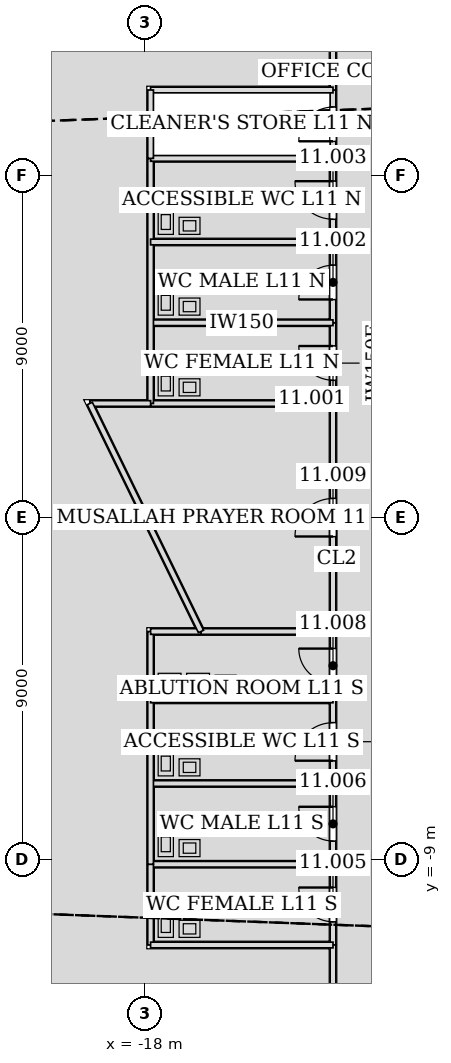
"""IFC4 building model, lengths in metres.
Left out: names, types, materials, properties, quantities, classifications, styles, units other than length and angle.
Written with IfcOpenShell. Run it as: python <this file> out.ifc"""

import sys

from ifc_helpers import new_model, si_unit, direction, frame, frame_2d, origin, place, context, subcontext, project, spatial, rectangle, extrude, element, fill, save


model = new_model("IFC4")
c1 = context("Model", 3, precision=1e-05, world=origin(), true_north=direction((0.0, 1.0)))
c2 = subcontext(c1, "Body", "Model", "MODEL_VIEW")
j1 = project(units=[si_unit("LENGTHUNIT", "METRE"), si_unit("PLANEANGLEUNIT", "RADIAN")], contexts=[c1])
p1 = place(None, origin())
s1 = spatial("IfcSite", under=j1, at=p1, CompositionType="ELEMENT")
p2 = place(p1, origin())
s2 = spatial("IfcBuilding", under=s1, at=p2, CompositionType="ELEMENT")
p3 = place(p2, frame((0.0, 0.0, 54.0)))
s3 = spatial("IfcBuildingStorey", under=s2, at=p3, CompositionType="ELEMENT", Elevation=54.0)
p4 = place(p3, frame((-13.05, 5.126, 0.0), z_axis=(0.0, 0.0, 1.0), x_axis=(0.0, -1.0, 0.0)))
e1 = element("IfcWall", 1, at=p4, inside=s3, PredefinedType="PARTITIONING", context=c2, shape_type="SweptSolid", body=[
    extrude(rectangle(XDim=2.127, YDim=0.15, at=frame_2d((1.063, 0.0))), origin(), (0.0, 0.0, 1.0), 4.035),
])
p5 = place(p4, frame((0.614, 0.0, 0.0)))
e2 = element("IfcOpeningElement", 2, at=p5, cuts=e1, PredefinedType="OPENING", context=c2, shape_type="SweptSolid", body=[
    extrude(rectangle(XDim=0.9, YDim=2.1, at=frame_2d((0.45, 1.05))), frame((0.0, 0.085, 0.0), z_axis=(0.0, -1.0, 0.0), x_axis=(1.0, 0.0, 0.0)), (0.0, 0.0, 1.0), 0.17),
])
p6 = place(p3, frame((-13.05, 7.251, 0.0), z_axis=(0.0, 0.0, 1.0), x_axis=(0.0, -1.0, 0.0)))
e3 = element("IfcWall", 3, at=p6, inside=s3, PredefinedType="PARTITIONING", context=c2, shape_type="SweptSolid", body=[
    extrude(rectangle(XDim=2.127, YDim=0.15, at=frame_2d((1.063, 0.0))), origin(), (0.0, 0.0, 1.0), 4.035),
])
p7 = place(p6, frame((0.614, 0.0, 0.0)))
e4 = element("IfcOpeningElement", 4, at=p7, cuts=e3, PredefinedType="OPENING", context=c2, shape_type="SweptSolid", body=[
    extrude(rectangle(XDim=0.9, YDim=2.1, at=frame_2d((0.45, 1.05))), frame((0.0, 0.085, 0.0), z_axis=(0.0, -1.0, 0.0), x_axis=(1.0, 0.0, 0.0)), (0.0, 0.0, 1.0), 0.17),
])
p8 = place(p3, frame((-13.05, 9.451, 0.0), z_axis=(0.0, 0.0, 1.0), x_axis=(0.0, -1.0, 0.0)))
e5 = element("IfcWall", 5, at=p8, inside=s3, PredefinedType="PARTITIONING", context=c2, shape_type="SweptSolid", body=[
    extrude(rectangle(XDim=2.202, YDim=0.15, at=frame_2d((1.101, 0.0))), origin(), (0.0, 0.0, 1.0), 4.035),
])
p9 = place(p8, frame((0.601, 0.0, 0.0)))
e6 = element("IfcOpeningElement", 6, at=p9, cuts=e5, PredefinedType="OPENING", context=c2, shape_type="SweptSolid", body=[
    extrude(rectangle(XDim=1.0, YDim=2.1, at=frame_2d((0.5, 1.05))), frame((0.0, 0.085, 0.0), z_axis=(0.0, -1.0, 0.0), x_axis=(1.0, 0.0, 0.0)), (0.0, 0.0, 1.0), 0.17),
])
p10 = place(p3, frame((-13.05, 11.251, 0.0), z_axis=(0.0, 0.0, 1.0), x_axis=(0.0, -1.0, 0.0)))
e7 = element("IfcWall", 7, at=p10, inside=s3, PredefinedType="PARTITIONING", context=c2, shape_type="SweptSolid", body=[
    extrude(rectangle(XDim=1.802, YDim=0.15, at=frame_2d((0.901, 0.0))), origin(), (0.0, 0.0, 1.0), 3.014),
])
p11 = place(p10, frame((0.451, 0.0, 0.0)))
e8 = element("IfcOpeningElement", 8, at=p11, cuts=e7, PredefinedType="OPENING", context=c2, shape_type="SweptSolid", body=[
    extrude(rectangle(XDim=0.9, YDim=2.1, at=frame_2d((0.45, 1.05))), frame((0.0, 0.085, 0.0), z_axis=(0.0, -1.0, 0.0), x_axis=(1.0, 0.0, 0.0)), (0.0, 0.0, 1.0), 0.17),
])
p12 = place(p3, frame((-13.05, -9.124, 0.0), z_axis=(0.0, 0.0, 1.0), x_axis=(0.0, -1.0, 0.0)))
e9 = element("IfcWall", 9, at=p12, inside=s3, PredefinedType="PARTITIONING", context=c2, shape_type="SweptSolid", body=[
    extrude(rectangle(XDim=2.127, YDim=0.15, at=frame_2d((1.063, 0.0))), origin(), (0.0, 0.0, 1.0), 3.014),
])
p13 = place(p12, frame((0.614, 0.0, 0.0)))
e10 = element("IfcOpeningElement", 10, at=p13, cuts=e9, PredefinedType="OPENING", context=c2, shape_type="SweptSolid", body=[
    extrude(rectangle(XDim=0.9, YDim=2.1, at=frame_2d((0.45, 1.05))), frame((0.0, 0.085, 0.0), z_axis=(0.0, -1.0, 0.0), x_axis=(1.0, 0.0, 0.0)), (0.0, 0.0, 1.0), 0.17),
])
p14 = place(p3, frame((-13.05, -6.999, 0.0), z_axis=(0.0, 0.0, 1.0), x_axis=(0.0, -1.0, 0.0)))
e11 = element("IfcWall", 11, at=p14, inside=s3, PredefinedType="PARTITIONING", context=c2, shape_type="SweptSolid", body=[
    extrude(rectangle(XDim=2.127, YDim=0.15, at=frame_2d((1.063, 0.0))), origin(), (0.0, 0.0, 1.0), 4.035),
])
p15 = place(p14, frame((0.614, 0.0, 0.0)))
e12 = element("IfcOpeningElement", 12, at=p15, cuts=e11, PredefinedType="OPENING", context=c2, shape_type="SweptSolid", body=[
    extrude(rectangle(XDim=0.9, YDim=2.1, at=frame_2d((0.45, 1.05))), frame((0.0, 0.085, 0.0), z_axis=(0.0, -1.0, 0.0), x_axis=(1.0, 0.0, 0.0)), (0.0, 0.0, 1.0), 0.17),
])
p16 = place(p3, frame((-13.05, -4.799, 0.0), z_axis=(0.0, 0.0, 1.0), x_axis=(0.0, -1.0, 0.0)))
e13 = element("IfcWall", 13, at=p16, inside=s3, PredefinedType="PARTITIONING", context=c2, shape_type="SweptSolid", body=[
    extrude(rectangle(XDim=2.202, YDim=0.15, at=frame_2d((1.101, 0.0))), origin(), (0.0, 0.0, 1.0), 4.035),
])
p17 = place(p16, frame((0.601, 0.0, 0.0)))
e14 = element("IfcOpeningElement", 14, at=p17, cuts=e13, PredefinedType="OPENING", context=c2, shape_type="SweptSolid", body=[
    extrude(rectangle(XDim=1.0, YDim=2.1, at=frame_2d((0.5, 1.05))), frame((0.0, 0.085, 0.0), z_axis=(0.0, -1.0, 0.0), x_axis=(1.0, 0.0, 0.0)), (0.0, 0.0, 1.0), 0.17),
])
p18 = place(p3, frame((-13.05, -2.999, 0.0), z_axis=(0.0, 0.0, 1.0), x_axis=(0.0, -1.0, 0.0)))
e15 = element("IfcWall", 15, at=p18, inside=s3, PredefinedType="PARTITIONING", context=c2, shape_type="SweptSolid", body=[
    extrude(rectangle(XDim=1.802, YDim=0.15, at=frame_2d((0.901, 0.0))), origin(), (0.0, 0.0, 1.0), 4.035),
])
p19 = place(p18, frame((0.451, 0.0, 0.0)))
e16 = element("IfcOpeningElement", 16, at=p19, cuts=e15, PredefinedType="OPENING", context=c2, shape_type="SweptSolid", body=[
    extrude(rectangle(XDim=0.9, YDim=2.1, at=frame_2d((0.45, 1.05))), frame((0.0, 0.085, 0.0), z_axis=(0.0, -1.0, 0.0), x_axis=(1.0, 0.0, 0.0)), (0.0, 0.0, 1.0), 0.17),
])
p20 = place(p3, frame((-13.05, 3.001, 0.0), z_axis=(0.0, 0.0, 1.0), x_axis=(0.0, -1.0, 0.0)))
e17 = element("IfcWall", 17, at=p20, inside=s3, PredefinedType="PARTITIONING", context=c2, shape_type="SweptSolid", body=[
    extrude(rectangle(XDim=6.002, YDim=0.15, at=frame_2d((3.001, 0.0))), origin(), (0.0, 0.0, 1.0), 2.984),
])
p21 = place(p20, frame((2.501, 0.0, 0.0)))
e18 = element("IfcOpeningElement", 18, at=p21, cuts=e17, PredefinedType="OPENING", context=c2, shape_type="SweptSolid", body=[
    extrude(rectangle(XDim=1.0, YDim=2.1, at=frame_2d((0.5, 1.05))), frame((0.0, 0.085, 0.0), z_axis=(0.0, -1.0, 0.0), x_axis=(1.0, 0.0, 0.0)), (0.0, 0.0, 1.0), 0.17),
])
for number, where, z_axis, x_axis in (
    (19, (-13.05, -11.249, 0.0), (0.0, 0.0, 1.0), (0.0, -1.0, 0.0)),
    (20, (-13.05, 13.05, 0.0), (0.0, 0.0, 1.0), (0.0, -1.0, 0.0)),
):
    element("IfcWall", number, at=place(p3, frame(where, z_axis=z_axis, x_axis=x_axis)), inside=s3, PredefinedType="PARTITIONING", context=c2, shape_type="SweptSolid", body=[
        extrude(rectangle(XDim=1.801, YDim=0.15, at=frame_2d((0.9, 0.0))), origin(), (0.0, 0.0, 1.0), 3.098),
    ])
for number, where, z_axis, x_axis in (
    (21, (-13.05, 5.125, 0.0), (0.0, 0.0, 1.0), (-1.0, 0.0, 0.0)),
    (22, (-17.85, 3.0, 0.0), (0.0, 0.0, 1.0), (1.0, 0.0, 0.0)),
):
    element("IfcWall", number, at=place(p3, frame(where, z_axis=z_axis, x_axis=x_axis)), inside=s3, PredefinedType="PARTITIONING", context=c2, shape_type="SweptSolid", body=[
        extrude(rectangle(XDim=4.8, YDim=0.15, at=frame_2d((2.4, 0.0))), origin(), (0.0, 0.0, 1.0), 3.423),
    ])
p22 = place(p3, frame((-17.85, 3.0, 0.0), z_axis=(0.0, 0.0, 1.0), x_axis=(0.0, 1.0, 0.0)))
e23 = element("IfcWall", 23, at=p22, inside=s3, PredefinedType="PARTITIONING", context=c2, shape_type="SweptSolid", body=[
    extrude(rectangle(XDim=6.45, YDim=0.15, at=frame_2d((3.225, 0.0))), origin(), (0.0, 0.0, 1.0), 4.035),
])
for number, where, z_axis, x_axis in (
    (24, (-13.05, 7.25, 0.0), (0.0, 0.0, 1.0), (-1.0, 0.0, 0.0)),
    (25, (-13.05, 9.45, 0.0), (0.0, 0.0, 1.0), (-1.0, 0.0, 0.0)),
):
    element("IfcWall", number, at=place(p3, frame(where, z_axis=z_axis, x_axis=x_axis)), inside=s3, PredefinedType="PARTITIONING", context=c2, shape_type="SweptSolid", body=[
        extrude(rectangle(XDim=4.8, YDim=0.15, at=frame_2d((2.4, 0.0))), origin(), (0.0, 0.0, 1.0), 3.423),
    ])
p23 = place(p3, frame((-13.05, 11.25, 0.0), z_axis=(0.0, 0.0, 1.0), x_axis=(-1.0, 0.0, 0.0)))
e26 = element("IfcWall", 26, at=p23, inside=s3, PredefinedType="PARTITIONING", context=c2, shape_type="SweptSolid", body=[
    extrude(rectangle(XDim=4.8, YDim=0.15, at=frame_2d((2.4, 0.0))), origin(), (0.0, 0.0, 1.0), 3.715),
])
p24 = place(p3, frame((-17.85, 11.25, 0.0), z_axis=(0.0, 0.0, 1.0), x_axis=(0.0, -1.0, 0.0)))
e27 = element("IfcWall", 27, at=p24, inside=s3, PredefinedType="PARTITIONING", context=c2, shape_type="SweptSolid", body=[
    extrude(rectangle(XDim=1.8, YDim=0.15, at=frame_2d((0.9, 0.0))), origin(), (0.0, 0.0, 1.0), 3.014),
])
p25 = place(p3, frame((-13.05, -9.125, 0.0), z_axis=(0.0, 0.0, 1.0), x_axis=(-1.0, 0.0, 0.0)))
e28 = element("IfcWall", 28, at=p25, inside=s3, PredefinedType="PARTITIONING", context=c2, shape_type="SweptSolid", body=[
    extrude(rectangle(XDim=4.8, YDim=0.15, at=frame_2d((2.4, 0.0))), origin(), (0.0, 0.0, 1.0), 3.423),
])
p26 = place(p3, frame((-17.85, -9.125, 0.0), z_axis=(0.0, 0.0, 1.0), x_axis=(0.0, -1.0, 0.0)))
e29 = element("IfcWall", 29, at=p26, inside=s3, PredefinedType="PARTITIONING", context=c2, shape_type="SweptSolid", body=[
    extrude(rectangle(XDim=2.125, YDim=0.15, at=frame_2d((1.062, 0.0))), origin(), (0.0, 0.0, 1.0), 3.014),
])
p27 = place(p3, frame((-17.85, -11.25, 0.0), z_axis=(0.0, 0.0, 1.0), x_axis=(1.0, 0.0, 0.0)))
e30 = element("IfcWall", 30, at=p27, inside=s3, PredefinedType="PARTITIONING", context=c2, shape_type="SweptSolid", body=[
    extrude(rectangle(XDim=4.8, YDim=0.15, at=frame_2d((2.4, 0.0))), origin(), (0.0, 0.0, 1.0), 3.715),
])
p28 = place(p3, frame((-13.05, -7.0, 0.0), z_axis=(0.0, 0.0, 1.0), x_axis=(-1.0, 0.0, 0.0)))
e31 = element("IfcWall", 31, at=p28, inside=s3, PredefinedType="PARTITIONING", context=c2, shape_type="SweptSolid", body=[
    extrude(rectangle(XDim=4.8, YDim=0.15, at=frame_2d((2.4, 0.0))), origin(), (0.0, 0.0, 1.0), 3.423),
])
p29 = place(p3, frame((-17.85, -9.125, 0.0), z_axis=(0.0, 0.0, 1.0), x_axis=(0.0, 1.0, 0.0)))
e32 = element("IfcWall", 32, at=p29, inside=s3, PredefinedType="PARTITIONING", context=c2, shape_type="SweptSolid", body=[
    extrude(rectangle(XDim=6.125, YDim=0.15, at=frame_2d((3.062, 0.0))), origin(), (0.0, 0.0, 1.0), 4.035),
])
p30 = place(p3, frame((-13.05, -4.8, 0.0), z_axis=(0.0, 0.0, 1.0), x_axis=(-1.0, 0.0, 0.0)))
e33 = element("IfcWall", 33, at=p30, inside=s3, PredefinedType="PARTITIONING", context=c2, shape_type="SweptSolid", body=[
    extrude(rectangle(XDim=4.8, YDim=0.15, at=frame_2d((2.4, 0.0))), origin(), (0.0, 0.0, 1.0), 3.423),
])
p31 = place(p3, frame((-13.05, -3.0, 0.0), z_axis=(0.0, 0.0, 1.0), x_axis=(-1.0, 0.0, 0.0)))
e34 = element("IfcWall", 34, at=p31, inside=s3, PredefinedType="PARTITIONING", context=c2, shape_type="SweptSolid", body=[
    extrude(rectangle(XDim=3.475, YDim=0.15, at=frame_2d((1.737, 0.0))), origin(), (0.0, 0.0, 1.0), 3.423),
])
p32 = place(p3, frame((-16.522, -3.0, 0.0), z_axis=(0.0, 0.0, 1.0), x_axis=(-1.0, 0.0, 0.0)))
e35 = element("IfcWall", 35, at=p32, inside=s3, PredefinedType="PARTITIONING", context=c2, shape_type="SweptSolid", body=[
    extrude(rectangle(XDim=1.328, YDim=0.15, at=frame_2d((0.664, 0.0))), origin(), (0.0, 0.0, 1.0), 3.565),
])
p33 = place(p3, frame((-17.849, 3.0, 0.0), z_axis=(0.0, 0.0, 1.0), x_axis=(-1.0, 0.0, 0.0)))
e36 = element("IfcWall", 36, at=p33, inside=s3, PredefinedType="PARTITIONING", context=c2, shape_type="SweptSolid", body=[
    extrude(rectangle(XDim=1.601, YDim=0.15, at=frame_2d((0.8, 0.0))), origin(), (0.0, 0.0, 1.0), 4.035),
])
p34 = place(p3, frame((-19.45, 3.0, 0.0), z_axis=(0.0, 0.0, 1.0), x_axis=(0.43835589904, -0.898801482963, 0.0)))
e37 = element("IfcWall", 37, at=p34, inside=s3, PredefinedType="PARTITIONING", context=c2, shape_type="SweptSolid", body=[
    extrude(rectangle(XDim=6.676, YDim=0.15, at=frame_2d((3.338, 0.0))), origin(), (0.0, 0.0, 1.0), 2.984),
])
p35 = place(p5, frame((0.9, 0.0, 0.0), z_axis=(0.0, 0.0, 1.0), x_axis=(-1.0, 0.0, 0.0)))
e38 = element("IfcDoor", 38, at=p35, inside=s3, OperationType="SINGLE_SWING_RIGHT", PredefinedType="DOOR", context=c2, shape_type="SweptSolid", body=[
    extrude(rectangle(XDim=0.9, YDim=2.1, at=frame_2d((0.45, 1.05))), frame((0.0, 0.025, 0.0), z_axis=(0.0, -1.0, 0.0), x_axis=(1.0, 0.0, 0.0)), (0.0, 0.0, 1.0), 0.05),
])
fill(e2, e38)
p36 = place(p7, frame((0.9, 0.0, 0.0), z_axis=(0.0, 0.0, 1.0), x_axis=(-1.0, 0.0, 0.0)))
e39 = element("IfcDoor", 39, at=p36, inside=s3, OperationType="SINGLE_SWING_LEFT", PredefinedType="DOOR", context=c2, shape_type="SweptSolid", body=[
    extrude(rectangle(XDim=0.9, YDim=2.1, at=frame_2d((0.45, 1.05))), frame((0.0, 0.025, 0.0), z_axis=(0.0, -1.0, 0.0), x_axis=(1.0, 0.0, 0.0)), (0.0, 0.0, 1.0), 0.05),
])
fill(e4, e39)
p37 = place(p9, frame((1.0, 0.0, 0.0), z_axis=(0.0, 0.0, 1.0), x_axis=(-1.0, 0.0, 0.0)))
e40 = element("IfcDoor", 40, at=p37, inside=s3, OperationType="SINGLE_SWING_RIGHT", PredefinedType="DOOR", context=c2, shape_type="SweptSolid", body=[
    extrude(rectangle(XDim=1.0, YDim=2.1, at=frame_2d((0.5, 1.05))), frame((0.0, 0.025, 0.0), z_axis=(0.0, -1.0, 0.0), x_axis=(1.0, 0.0, 0.0)), (0.0, 0.0, 1.0), 0.05),
])
fill(e6, e40)
p38 = place(p11, frame((0.9, 0.0, 0.0), z_axis=(0.0, 0.0, 1.0), x_axis=(-1.0, 0.0, 0.0)))
e41 = element("IfcDoor", 41, at=p38, inside=s3, OperationType="SINGLE_SWING_LEFT", PredefinedType="DOOR", context=c2, shape_type="SweptSolid", body=[
    extrude(rectangle(XDim=0.9, YDim=2.1, at=frame_2d((0.45, 1.05))), frame((0.0, 0.025, 0.0), z_axis=(0.0, -1.0, 0.0), x_axis=(1.0, 0.0, 0.0)), (0.0, 0.0, 1.0), 0.05),
])
fill(e8, e41)
p39 = place(p13, frame((0.9, 0.0, 0.0), z_axis=(0.0, 0.0, 1.0), x_axis=(-1.0, 0.0, 0.0)))
e42 = element("IfcDoor", 42, at=p39, inside=s3, OperationType="SINGLE_SWING_RIGHT", PredefinedType="DOOR", context=c2, shape_type="SweptSolid", body=[
    extrude(rectangle(XDim=0.9, YDim=2.1, at=frame_2d((0.45, 1.05))), frame((0.0, 0.025, 0.0), z_axis=(0.0, -1.0, 0.0), x_axis=(1.0, 0.0, 0.0)), (0.0, 0.0, 1.0), 0.05),
])
fill(e10, e42)
p40 = place(p15, frame((0.9, 0.0, 0.0), z_axis=(0.0, 0.0, 1.0), x_axis=(-1.0, 0.0, 0.0)))
e43 = element("IfcDoor", 43, at=p40, inside=s3, OperationType="SINGLE_SWING_RIGHT", PredefinedType="DOOR", context=c2, shape_type="SweptSolid", body=[
    extrude(rectangle(XDim=0.9, YDim=2.1, at=frame_2d((0.45, 1.05))), frame((0.0, 0.025, 0.0), z_axis=(0.0, -1.0, 0.0), x_axis=(1.0, 0.0, 0.0)), (0.0, 0.0, 1.0), 0.05),
])
fill(e12, e43)
p41 = place(p17, frame((1.0, 0.0, 0.0), z_axis=(0.0, 0.0, 1.0), x_axis=(-1.0, 0.0, 0.0)))
e44 = element("IfcDoor", 44, at=p41, inside=s3, OperationType="SINGLE_SWING_LEFT", PredefinedType="DOOR", context=c2, shape_type="SweptSolid", body=[
    extrude(rectangle(XDim=1.0, YDim=2.1, at=frame_2d((0.5, 1.05))), frame((0.0, 0.025, 0.0), z_axis=(0.0, -1.0, 0.0), x_axis=(1.0, 0.0, 0.0)), (0.0, 0.0, 1.0), 0.05),
])
fill(e14, e44)
p42 = place(p19, frame((0.9, 0.0, 0.0), z_axis=(0.0, 0.0, 1.0), x_axis=(-1.0, 0.0, 0.0)))
e45 = element("IfcDoor", 45, at=p42, inside=s3, OperationType="SINGLE_SWING_RIGHT", PredefinedType="DOOR", context=c2, shape_type="SweptSolid", body=[
    extrude(rectangle(XDim=0.9, YDim=2.1, at=frame_2d((0.45, 1.05))), frame((0.0, 0.025, 0.0), z_axis=(0.0, -1.0, 0.0), x_axis=(1.0, 0.0, 0.0)), (0.0, 0.0, 1.0), 0.05),
])
fill(e16, e45)
p43 = place(p21, frame((1.0, 0.0, 0.0), z_axis=(0.0, 0.0, 1.0), x_axis=(-1.0, 0.0, 0.0)))
e46 = element("IfcDoor", 46, at=p43, inside=s3, OperationType="SINGLE_SWING_LEFT", PredefinedType="DOOR", context=c2, shape_type="SweptSolid", body=[
    extrude(rectangle(XDim=1.0, YDim=2.1, at=frame_2d((0.5, 1.05))), frame((0.0, 0.025, 0.0), z_axis=(0.0, -1.0, 0.0), x_axis=(1.0, 0.0, 0.0)), (0.0, 0.0, 1.0), 0.05),
])
fill(e18, e46)
save(model, sys.argv[1])
